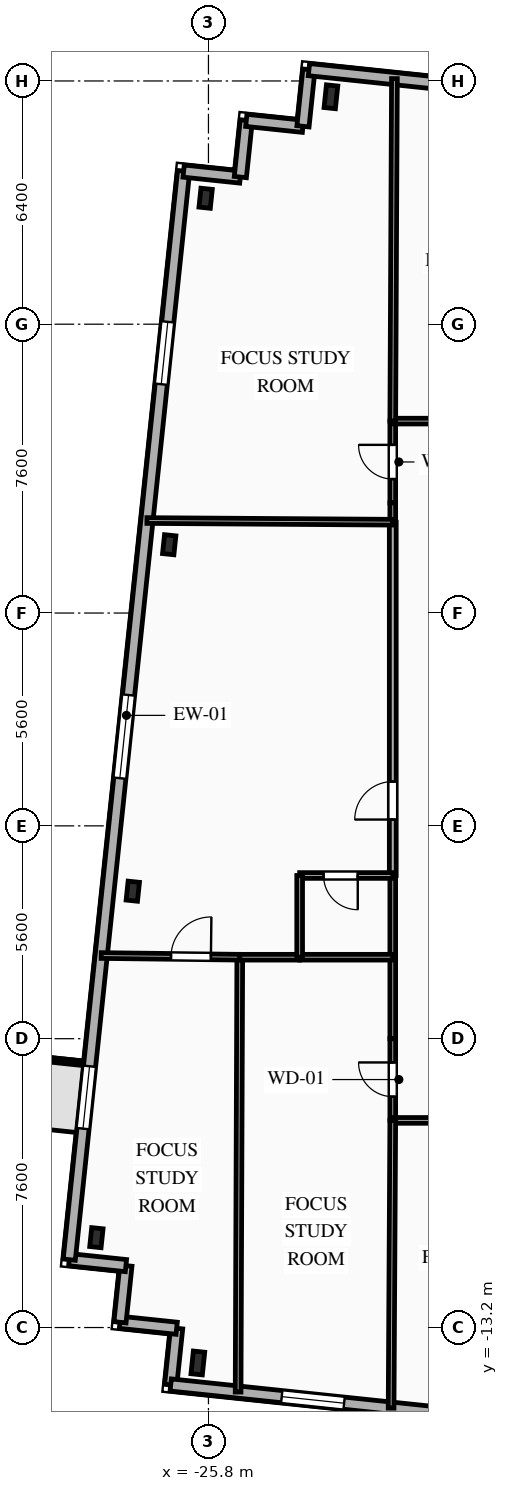
"""IFC4 building model, lengths in metres.
Left out: names, types, materials, properties, quantities, classifications, styles, units other than length and angle.
Written with IfcOpenShell. Run it as: python <this file> out.ifc"""

import sys

from ifc_helpers import new_model, si_unit, direction, frame, frame_2d, origin, origin_2d, place, context, subcontext, project, spatial, rectangle, i_section, extrude, element, fill, save


model = new_model("IFC4")
c1 = context("Model", 3, precision=1e-05, world=origin(), true_north=direction((0.0, 1.0)))
c2 = subcontext(c1, "Body", "Model", "MODEL_VIEW")
j1 = project(units=[si_unit("LENGTHUNIT", "METRE"), si_unit("PLANEANGLEUNIT", "RADIAN")], contexts=[c1])
p1 = place(None, origin())
s1 = spatial("IfcSite", under=j1, at=p1, CompositionType="ELEMENT")
p2 = place(p1, origin())
s2 = spatial("IfcBuilding", under=s1, at=p2, CompositionType="ELEMENT")
p3 = place(p2, frame((0.0, 0.0, 213.15)))
s3 = spatial("IfcBuildingStorey", under=s2, at=p3, CompositionType="ELEMENT", Elevation=213.15)
for number, where, z_axis, x_axis in (
    (1, (-26.079, -14.133, 0.0), (0.0, 0.0, 1.0), (0.995, -0.105, 0.0)),
    (2, (-22.577, 19.184, 0.0), (0.0, 0.0, 1.0), (0.995, -0.105, 0.0)),
):
    element("IfcColumn", number, at=place(p3, frame(where, z_axis=z_axis, x_axis=x_axis)), inside=s3, PredefinedType="COLUMN", context=c2, shape_type="SweptSolid", body=[
        extrude(i_section(OverallWidth=0.3, OverallDepth=0.6, WebThickness=0.015, FlangeThickness=0.03, FilletRadius=0.027, at=origin_2d()), origin(), (0.0, 0.0, 1.0), 3.35),
    ])
for number, where, z_axis, x_axis in (
    (3, (-25.875, 16.514, 0.0), (0.0, 0.0, 1.0), (0.995, -0.105, 0.0)),
    (4, (-26.833, 7.398, 0.0), (0.0, 0.0, 1.0), (0.995, -0.105, 0.0)),
    (5, (-27.791, -1.719, 0.0), (0.0, 0.0, 1.0), (0.995, -0.105, 0.0)),
    (6, (-28.749, -10.835, 0.0), (0.0, 0.0, 1.0), (0.995, -0.105, 0.0)),
):
    element("IfcColumn", number, at=place(p3, frame(where, z_axis=z_axis, x_axis=x_axis)), inside=s3, PredefinedType="COLUMN", context=c2, shape_type="SweptSolid", body=[
        extrude(i_section(OverallWidth=0.3, OverallDepth=0.5, WebThickness=0.014, FlangeThickness=0.028, FilletRadius=0.027, at=origin_2d()), origin(), (0.0, 0.0, 1.0), 3.35),
    ])
for number, where, z_axis, x_axis in (
    (7, (-26.793, -14.711, 0.0), (0.0, 0.0, 1.0), (0.104, 0.995, 0.0)),
    (8, (-26.637, -13.219, 0.0), (0.0, 0.0, 1.0), (-0.995, 0.104, 0.0)),
):
    element("IfcWall", number, at=place(p3, frame(where, z_axis=z_axis, x_axis=x_axis)), inside=s3, PredefinedType="SOLIDWALL", context=c2, shape_type="SweptSolid", body=[
        extrude(rectangle(XDim=1.5, YDim=0.32, at=frame_2d((0.75, 0.0))), origin(), (0.0, 0.0, 1.0), 3.04),
    ])
p4 = place(p3, frame((-28.128, -13.062, 0.0), z_axis=(0.0, 0.0, 1.0), x_axis=(0.104481464157, 0.994526834051, 0.0)))
e9 = element("IfcWall", 9, at=p4, inside=s3, PredefinedType="SOLIDWALL", context=c2, shape_type="SweptSolid", body=[
    extrude(rectangle(XDim=1.5, YDim=0.32, at=frame_2d((0.75, 0.0))), origin(), (0.0, 0.0, 1.0), 3.04),
])
p5 = place(p3, frame((-27.972, -11.571, 0.0), z_axis=(0.0, 0.0, 1.0), x_axis=(-0.994525057048, 0.104498377516, 0.0)))
e10 = element("IfcWall", 10, at=p5, inside=s3, PredefinedType="SOLIDWALL", context=c2, shape_type="SweptSolid", body=[
    extrude(rectangle(XDim=1.5, YDim=0.32, at=frame_2d((0.75, 0.0))), origin(), (0.0, 0.0, 1.0), 3.04),
])
p6 = place(p3, frame((-29.463, -11.414, 0.0), z_axis=(0.0, 0.0, 1.0), x_axis=(0.104530779244, 0.994521651947, 0.0)))
e11 = element("IfcWall", 11, at=p6, inside=s3, PredefinedType="SOLIDWALL", context=c2, shape_type="SweptSolid", body=[
    extrude(rectangle(XDim=28.8, YDim=0.32, at=frame_2d((14.4, 0.0))), origin(), (0.0, 0.0, 1.0), 3.04),
])
p7 = place(p6, frame((3.467, 0.0, 0.85)))
e12 = element("IfcOpeningElement", 12, at=p7, cuts=e11, PredefinedType="OPENING", context=c2, shape_type="SweptSolid", body=[
    extrude(rectangle(XDim=1.65, YDim=1.85, at=frame_2d((0.825, 0.925))), frame((0.0, 0.17, 0.0), z_axis=(0.0, -1.0, 0.0), x_axis=(1.0, 0.0, 0.0)), (0.0, 0.0, 1.0), 0.34),
])
p8 = place(p6, frame((12.738, 0.0, 0.85)))
e13 = element("IfcOpeningElement", 13, at=p8, cuts=e11, PredefinedType="OPENING", context=c2, shape_type="SweptSolid", body=[
    extrude(rectangle(XDim=2.2, YDim=1.85, at=frame_2d((1.1, 0.925))), frame((0.0, 0.17, 0.0), z_axis=(0.0, -1.0, 0.0), x_axis=(1.0, 0.0, 0.0)), (0.0, 0.0, 1.0), 0.34),
])
p9 = place(p6, frame((23.162, 0.0, 0.85)))
e14 = element("IfcOpeningElement", 14, at=p9, cuts=e11, PredefinedType="OPENING", context=c2, shape_type="SweptSolid", body=[
    extrude(rectangle(XDim=1.65, YDim=1.85, at=frame_2d((0.825, 0.925))), frame((0.0, 0.17, 0.0), z_axis=(0.0, -1.0, 0.0), x_axis=(1.0, 0.0, 0.0)), (0.0, 0.0, 1.0), 0.34),
])
p10 = place(p3, frame((-26.453, 17.229, 0.0), z_axis=(0.0, 0.0, 1.0), x_axis=(0.994508128223, -0.104659366031, 0.0)))
e15 = element("IfcWall", 15, at=p10, inside=s3, PredefinedType="SOLIDWALL", context=c2, shape_type="SweptSolid", body=[
    extrude(rectangle(XDim=1.5, YDim=0.32, at=frame_2d((0.75, 0.0))), origin(), (0.0, 0.0, 1.0), 3.04),
])
p11 = place(p3, frame((-24.961, 17.072, 0.0), z_axis=(0.0, 0.0, 1.0), x_axis=(0.104642427191, 0.994509910675, 0.0)))
e16 = element("IfcWall", 16, at=p11, inside=s3, PredefinedType="SOLIDWALL", context=c2, shape_type="SweptSolid", body=[
    extrude(rectangle(XDim=1.5, YDim=0.32, at=frame_2d((0.75, 0.0))), origin(), (0.0, 0.0, 1.0), 3.04),
])
p12 = place(p3, frame((-24.804, 18.563, 0.0), z_axis=(0.0, 0.0, 1.0), x_axis=(0.994508128223, -0.104659366031, 0.0)))
e17 = element("IfcWall", 17, at=p12, inside=s3, PredefinedType="SOLIDWALL", context=c2, shape_type="SweptSolid", body=[
    extrude(rectangle(XDim=1.5, YDim=0.32, at=frame_2d((0.75, 0.0))), origin(), (0.0, 0.0, 1.0), 3.04),
])
p13 = place(p3, frame((-23.312, 18.406, 0.0), z_axis=(0.0, 0.0, 1.0), x_axis=(0.104481464157, 0.994526834051, 0.0)))
e18 = element("IfcWall", 18, at=p13, inside=s3, PredefinedType="SOLIDWALL", context=c2, shape_type="SweptSolid", body=[
    extrude(rectangle(XDim=1.5, YDim=0.32, at=frame_2d((0.75, 0.0))), origin(), (0.0, 0.0, 1.0), 3.04),
])
p14 = place(p3, frame((-23.156, 19.898, 0.0), z_axis=(0.0, 0.0, 1.0), x_axis=(0.994522001802, -0.104527450613, 0.0)))
e19 = element("IfcWall", 19, at=p14, inside=s3, PredefinedType="SOLIDWALL", context=c2, shape_type="SweptSolid", body=[
    extrude(rectangle(XDim=45.8, YDim=0.32, at=frame_2d((22.9, 0.0))), origin(), (0.0, 0.0, 1.0), 3.04),
])
p15 = place(p14, frame((4.9, 0.0, 0.85)))
e20 = element("IfcOpeningElement", 20, at=p15, cuts=e19, PredefinedType="OPENING", context=c2, shape_type="SweptSolid", body=[
    extrude(rectangle(XDim=1.65, YDim=1.85, at=frame_2d((0.825, 0.925))), frame((0.0, 0.17, 0.0), z_axis=(0.0, -1.0, 0.0), x_axis=(1.0, 0.0, 0.0)), (0.0, 0.0, 1.0), 0.34),
])
p16 = place(p14, frame((11.706, 0.0, 0.85)))
e21 = element("IfcOpeningElement", 21, at=p16, cuts=e19, PredefinedType="OPENING", context=c2, shape_type="SweptSolid", body=[
    extrude(rectangle(XDim=1.65, YDim=1.85, at=frame_2d((0.825, 0.925))), frame((0.0, 0.17, 0.0), z_axis=(0.0, -1.0, 0.0), x_axis=(1.0, 0.0, 0.0)), (0.0, 0.0, 1.0), 0.34),
])
p17 = place(p14, frame((23.431, 0.0, 0.85)))
e22 = element("IfcOpeningElement", 22, at=p17, cuts=e19, PredefinedType="OPENING", context=c2, shape_type="SweptSolid", body=[
    extrude(rectangle(XDim=1.5, YDim=1.85, at=frame_2d((0.75, 0.925))), frame((0.0, 0.17, 0.0), z_axis=(0.0, -1.0, 0.0), x_axis=(1.0, 0.0, 0.0)), (0.0, 0.0, 1.0), 0.34),
])
p18 = place(p14, frame((34.628, 0.0, 0.85)))
e23 = element("IfcOpeningElement", 23, at=p18, cuts=e19, PredefinedType="OPENING", context=c2, shape_type="SweptSolid", body=[
    extrude(rectangle(XDim=1.65, YDim=1.85, at=frame_2d((0.825, 0.925))), frame((0.0, 0.17, 0.0), z_axis=(0.0, -1.0, 0.0), x_axis=(1.0, 0.0, 0.0)), (0.0, 0.0, 1.0), 0.34),
])
p19 = place(p3, frame((18.756, -19.498, 0.0), z_axis=(0.0, 0.0, 1.0), x_axis=(-0.994522060044, 0.104526896475, 0.0)))
e24 = element("IfcWall", 24, at=p19, inside=s3, PredefinedType="SOLIDWALL", context=c2, shape_type="SweptSolid", body=[
    extrude(rectangle(XDim=45.8, YDim=0.32, at=frame_2d((22.9, 0.0))), origin(), (0.0, 0.0, 1.0), 3.04),
])
p20 = place(p19, frame((1.657, 0.0, 0.85)))
e25 = element("IfcOpeningElement", 25, at=p20, cuts=e24, PredefinedType="OPENING", context=c2, shape_type="SweptSolid", body=[
    extrude(rectangle(XDim=1.65, YDim=1.85, at=frame_2d((0.825, 0.925))), frame((0.0, 0.17, 0.0), z_axis=(0.0, -1.0, 0.0), x_axis=(1.0, 0.0, 0.0)), (0.0, 0.0, 1.0), 0.34),
])
p21 = place(p19, frame((6.907, 0.0, 0.85)))
e26 = element("IfcOpeningElement", 26, at=p21, cuts=e24, PredefinedType="OPENING", context=c2, shape_type="SweptSolid", body=[
    extrude(rectangle(XDim=2.2, YDim=1.85, at=frame_2d((1.1, 0.925))), frame((0.0, 0.17, 0.0), z_axis=(0.0, -1.0, 0.0), x_axis=(1.0, 0.0, 0.0)), (0.0, 0.0, 1.0), 0.34),
])
p22 = place(p19, frame((13.953, 0.0, 0.85)))
e27 = element("IfcOpeningElement", 27, at=p22, cuts=e24, PredefinedType="OPENING", context=c2, shape_type="SweptSolid", body=[
    extrude(rectangle(XDim=2.2, YDim=1.85, at=frame_2d((1.1, 0.925))), frame((0.0, 0.17, 0.0), z_axis=(0.0, -1.0, 0.0), x_axis=(1.0, 0.0, 0.0)), (0.0, 0.0, 1.0), 0.34),
])
p23 = place(p19, frame((20.959, 0.0, 0.85)))
e28 = element("IfcOpeningElement", 28, at=p23, cuts=e24, PredefinedType="OPENING", context=c2, shape_type="SweptSolid", body=[
    extrude(rectangle(XDim=2.2, YDim=1.85, at=frame_2d((1.1, 0.925))), frame((0.0, 0.17, 0.0), z_axis=(0.0, -1.0, 0.0), x_axis=(1.0, 0.0, 0.0)), (0.0, 0.0, 1.0), 0.34),
])
p24 = place(p19, frame((27.965, 0.0, 0.85)))
e29 = element("IfcOpeningElement", 29, at=p24, cuts=e24, PredefinedType="OPENING", context=c2, shape_type="SweptSolid", body=[
    extrude(rectangle(XDim=2.2, YDim=1.85, at=frame_2d((1.1, 0.925))), frame((0.0, 0.17, 0.0), z_axis=(0.0, -1.0, 0.0), x_axis=(1.0, 0.0, 0.0)), (0.0, 0.0, 1.0), 0.34),
])
p25 = place(p19, frame((35.487, 0.0, 0.85)))
e30 = element("IfcOpeningElement", 30, at=p25, cuts=e24, PredefinedType="OPENING", context=c2, shape_type="SweptSolid", body=[
    extrude(rectangle(XDim=1.65, YDim=1.85, at=frame_2d((0.825, 0.925))), frame((0.0, 0.17, 0.0), z_axis=(0.0, -1.0, 0.0), x_axis=(1.0, 0.0, 0.0)), (0.0, 0.0, 1.0), 0.34),
])
p26 = place(p19, frame((41.212, 0.0, 0.85)))
e31 = element("IfcOpeningElement", 31, at=p26, cuts=e24, PredefinedType="OPENING", context=c2, shape_type="SweptSolid", body=[
    extrude(rectangle(XDim=1.65, YDim=1.85, at=frame_2d((0.825, 0.925))), frame((0.0, 0.17, 0.0), z_axis=(0.0, -1.0, 0.0), x_axis=(1.0, 0.0, 0.0)), (0.0, 0.0, 1.0), 0.34),
])
p27 = place(p3, frame((-20.95, 8.5, 0.0), z_axis=(0.0, 0.0, 1.0), x_axis=(0.0, 1.0, 0.0)))
e32 = element("IfcWall", 32, at=p27, inside=s3, PredefinedType="PARTITIONING", context=c2, shape_type="SweptSolid", body=[
    extrude(rectangle(XDim=2.15, YDim=0.15, at=frame_2d((1.075, 0.0))), origin(), (0.0, 0.0, 1.0), 3.04),
])
p28 = place(p27, frame((0.625, 0.0, 0.0)))
e33 = element("IfcOpeningElement", 33, at=p28, cuts=e32, PredefinedType="OPENING", context=c2, shape_type="SweptSolid", body=[
    extrude(rectangle(XDim=0.9, YDim=2.1, at=frame_2d((0.45, 1.05))), frame((0.0, 0.085, 0.0), z_axis=(0.0, -1.0, 0.0), x_axis=(1.0, 0.0, 0.0)), (0.0, 0.0, 1.0), 0.17),
])
p29 = place(p3, frame((-20.95, 10.65, 0.0), z_axis=(0.0, 0.0, 1.0), x_axis=(1.0, 0.0, 0.0)))
e34 = element("IfcWall", 34, at=p29, inside=s3, PredefinedType="PARTITIONING", context=c2, shape_type="SweptSolid", body=[
    extrude(rectangle(XDim=6.783, YDim=0.15, at=frame_2d((3.392, 0.0))), origin(), (0.0, 0.0, 1.0), 3.04),
])
p30 = place(p29, frame((4.582, 0.0, 0.0)))
e35 = element("IfcOpeningElement", 35, at=p30, cuts=e34, PredefinedType="OPENING", context=c2, shape_type="SweptSolid", body=[
    extrude(rectangle(XDim=1.05, YDim=2.15, at=frame_2d((0.525, 1.075))), frame((0.0, 0.085, 0.0), z_axis=(0.0, -1.0, 0.0), x_axis=(1.0, 0.0, 0.0)), (0.0, 0.0, 1.0), 0.17),
])
p31 = place(p3, frame((-20.95, -7.75, 0.0), z_axis=(0.0, 0.0, 1.0), x_axis=(0.0, 1.0, 0.0)))
e36 = element("IfcWall", 36, at=p31, inside=s3, PredefinedType="PARTITIONING", context=c2, shape_type="SweptSolid", body=[
    extrude(rectangle(XDim=2.15, YDim=0.15, at=frame_2d((1.075, 0.0))), origin(), (0.0, 0.0, 1.0), 3.04),
])
p32 = place(p31, frame((0.625, 0.0, 0.0)))
e37 = element("IfcOpeningElement", 37, at=p32, cuts=e36, PredefinedType="OPENING", context=c2, shape_type="SweptSolid", body=[
    extrude(rectangle(XDim=0.9, YDim=2.1, at=frame_2d((0.45, 1.05))), frame((0.0, 0.085, 0.0), z_axis=(0.0, -1.0, 0.0), x_axis=(1.0, 0.0, 0.0)), (0.0, 0.0, 1.0), 0.17),
])
p33 = place(p3, frame((-13.567, -7.75, 0.0), z_axis=(0.0, 0.0, 1.0), x_axis=(-1.0, 0.0, 0.0)))
e38 = element("IfcWall", 38, at=p33, inside=s3, PredefinedType="PARTITIONING", context=c2, shape_type="SweptSolid", body=[
    extrude(rectangle(XDim=7.383, YDim=0.15, at=frame_2d((3.691, 0.0))), origin(), (0.0, 0.0, 1.0), 3.04),
])
p34 = place(p33, frame((1.227, 0.0, 0.0)))
e39 = element("IfcOpeningElement", 39, at=p34, cuts=e38, PredefinedType="OPENING", context=c2, shape_type="SweptSolid", body=[
    extrude(rectangle(XDim=1.05, YDim=2.15, at=frame_2d((0.525, 1.075))), frame((0.0, 0.085, 0.0), z_axis=(0.0, -1.0, 0.0), x_axis=(1.0, 0.0, 0.0)), (0.0, 0.0, 1.0), 0.17),
])
p35 = place(p3, frame((-20.95, -5.6, 0.0), z_axis=(0.0, 0.0, 1.0), x_axis=(0.0, 1.0, 0.0)))
e40 = element("IfcWall", 40, at=p35, inside=s3, PredefinedType="PARTITIONING", context=c2, shape_type="SweptSolid", body=[
    extrude(rectangle(XDim=2.144, YDim=0.15, at=frame_2d((1.072, 0.0))), origin(), (0.0, 0.0, 1.0), 3.04),
])
p36 = place(p3, frame((-20.95, -1.306, 0.0), z_axis=(0.0, 0.0, 1.0), x_axis=(0.0, 1.0, 0.0)))
e41 = element("IfcWall", 41, at=p36, inside=s3, PredefinedType="PARTITIONING", context=c2, shape_type="SweptSolid", body=[
    extrude(rectangle(XDim=9.296, YDim=0.18, at=frame_2d((4.648, 0.0))), origin(), (0.0, 0.0, 1.0), 3.04),
])
p37 = place(p36, frame((1.472, 0.0, 0.0)))
e42 = element("IfcOpeningElement", 42, at=p37, cuts=e41, PredefinedType="OPENING", context=c2, shape_type="SweptSolid", body=[
    extrude(rectangle(XDim=1.0, YDim=2.15, at=frame_2d((0.5, 1.075))), frame((0.0, 0.1, 0.0), z_axis=(0.0, -1.0, 0.0), x_axis=(1.0, 0.0, 0.0)), (0.0, 0.0, 1.0), 0.2),
])
p38 = place(p3, frame((-20.95, -3.456, 0.0), z_axis=(0.0, 0.0, 1.0), x_axis=(0.0, 1.0, 0.0)))
e43 = element("IfcWall", 43, at=p38, inside=s3, PredefinedType="PLUMBINGWALL", context=c2, shape_type="SweptSolid", body=[
    extrude(rectangle(XDim=2.15, YDim=0.15, at=frame_2d((1.075, 0.0))), origin(), (0.0, 0.0, 1.0), 3.04),
])
p39 = place(p3, frame((-20.95, 7.99, 0.0), z_axis=(0.0, 0.0, 1.0), x_axis=(0.0, 1.0, 0.0)))
e44 = element("IfcWall", 44, at=p39, inside=s3, PredefinedType="PARTITIONING", context=c2, shape_type="SweptSolid", body=[
    extrude(rectangle(XDim=0.51, YDim=0.15, at=frame_2d((0.255, 0.0))), origin(), (0.0, 0.0, 1.0), 3.04),
])
p40 = place(p3, frame((-24.976, -3.456, 0.0), z_axis=(0.0, 0.0, 1.0), x_axis=(-0.003840873, -0.99999262382, 0.0)))
e45 = element("IfcWall", 45, at=p40, inside=s3, PredefinedType="PARTITIONING", context=c2, shape_type="SweptSolid", body=[
    extrude(rectangle(XDim=11.441, YDim=0.15, at=frame_2d((5.721, 0.0))), origin(), (0.0, 0.0, 1.0), 3.04),
])
p41 = place(p3, frame((-28.622, -3.412, 0.0), z_axis=(0.0, 0.0, 1.0), x_axis=(0.999927389555, -0.01205054433, 0.0)))
e46 = element("IfcWall", 46, at=p41, inside=s3, PredefinedType="PARTITIONING", context=c2, shape_type="SweptSolid", body=[
    extrude(rectangle(XDim=3.647, YDim=0.15, at=frame_2d((1.823, 0.0))), origin(), (0.0, 0.0, 1.0), 3.04),
])
p42 = place(p41, frame((1.837, 0.0, 0.0)))
e47 = element("IfcOpeningElement", 47, at=p42, cuts=e46, PredefinedType="OPENING", context=c2, shape_type="SweptSolid", body=[
    extrude(rectangle(XDim=1.05, YDim=2.15, at=frame_2d((0.525, 1.075))), frame((0.0, 0.085, 0.0), z_axis=(0.0, -1.0, 0.0), x_axis=(1.0, 0.0, 0.0)), (0.0, 0.0, 1.0), 0.17),
])
p43 = place(p3, frame((-24.976, -3.456, 0.0), z_axis=(0.0, 0.0, 1.0), x_axis=(1.0, 0.0, 0.0)))
e48 = element("IfcWall", 48, at=p43, inside=s3, PredefinedType="PARTITIONING", context=c2, shape_type="SweptSolid", body=[
    extrude(rectangle(XDim=1.576, YDim=0.15, at=frame_2d((0.788, 0.0))), origin(), (0.0, 0.0, 1.0), 3.04),
])
p44 = place(p3, frame((-23.4, -3.456, 0.0), z_axis=(0.0, 0.0, 1.0), x_axis=(1.0, 0.0, 0.0)))
e49 = element("IfcWall", 49, at=p44, inside=s3, PredefinedType="PLUMBINGWALL", context=c2, shape_type="SweptSolid", body=[
    extrude(rectangle(XDim=2.45, YDim=0.15, at=frame_2d((1.225, 0.0))), origin(), (0.0, 0.0, 1.0), 3.04),
])
p45 = place(p3, frame((-20.95, -7.75, 0.0), z_axis=(0.0, 0.0, 1.0), x_axis=(-0.005804668564, -0.99998315277, 0.0)))
e50 = element("IfcWall", 50, at=p45, inside=s3, PredefinedType="PARTITIONING", context=c2, shape_type="SweptSolid", body=[
    extrude(rectangle(XDim=7.571, YDim=0.15, at=frame_2d((3.785, 0.0))), origin(), (0.0, 0.0, 1.0), 3.04),
])
p46 = place(p3, frame((-20.95, -1.306, 0.0), z_axis=(0.0, 0.0, 1.0), x_axis=(-1.0, 0.0, 0.0)))
e51 = element("IfcWall", 51, at=p46, inside=s3, PredefinedType="PLUMBINGWALL", context=c2, shape_type="SweptSolid", body=[
    extrude(rectangle(XDim=2.45, YDim=0.15, at=frame_2d((1.225, 0.0))), origin(), (0.0, 0.0, 1.0), 3.04),
])
p47 = place(p46, frame((0.921, 0.0, 0.0)))
e52 = element("IfcOpeningElement", 52, at=p47, cuts=e51, PredefinedType="OPENING", context=c2, shape_type="SweptSolid", body=[
    extrude(rectangle(XDim=0.9, YDim=2.1, at=frame_2d((0.45, 1.05))), frame((0.0, 0.085, 0.0), z_axis=(0.0, -1.0, 0.0), x_axis=(1.0, 0.0, 0.0)), (0.0, 0.0, 1.0), 0.17),
])
p48 = place(p3, frame((-23.4, -1.306, 0.0), z_axis=(0.0, 0.0, 1.0), x_axis=(0.0, -1.0, 0.0)))
e53 = element("IfcWall", 53, at=p48, inside=s3, PredefinedType="PLUMBINGWALL", context=c2, shape_type="SweptSolid", body=[
    extrude(rectangle(XDim=2.15, YDim=0.15, at=frame_2d((1.075, 0.0))), origin(), (0.0, 0.0, 1.0), 2.695),
])
p49 = place(p3, frame((-27.419, 8.034, 0.0), z_axis=(0.0, 0.0, 1.0), x_axis=(0.999976928608, -0.006792808784, 0.0)))
e54 = element("IfcWall", 54, at=p49, inside=s3, PredefinedType="PARTITIONING", context=c2, shape_type="SweptSolid", body=[
    extrude(rectangle(XDim=6.469, YDim=0.15, at=frame_2d((3.235, 0.0))), origin(), (0.0, 0.0, 1.0), 3.04),
])
p50 = place(p3, frame((-20.906, 19.662, 0.0), z_axis=(0.0, 0.0, 1.0), x_axis=(-0.004876272857, -0.999988110911, 0.0)))
e55 = element("IfcWall", 55, at=p50, inside=s3, PredefinedType="PARTITIONING", context=c2, shape_type="SweptSolid", body=[
    extrude(rectangle(XDim=9.012, YDim=0.15, at=frame_2d((4.506, 0.0))), origin(), (0.0, 0.0, 1.0), 2.665),
])
p51 = place(p7, origin())
e56 = element("IfcWindow", 56, at=p51, inside=s3, PartitioningType="SINGLE_PANEL", PredefinedType="WINDOW", context=c2, shape_type="SweptSolid", body=[
    extrude(rectangle(XDim=1.65, YDim=1.85, at=frame_2d((0.825, 0.925))), frame((0.0, 0.03, 0.0), z_axis=(0.0, -1.0, 0.0), x_axis=(1.0, 0.0, 0.0)), (0.0, 0.0, 1.0), 0.06),
])
fill(e12, e56)
p52 = place(p8, origin())
e57 = element("IfcWindow", 57, at=p52, inside=s3, PartitioningType="SINGLE_PANEL", PredefinedType="WINDOW", context=c2, shape_type="SweptSolid", body=[
    extrude(rectangle(XDim=2.2, YDim=1.85, at=frame_2d((1.1, 0.925))), frame((0.0, 0.03, 0.0), z_axis=(0.0, -1.0, 0.0), x_axis=(1.0, 0.0, 0.0)), (0.0, 0.0, 1.0), 0.06),
])
fill(e13, e57)
p53 = place(p9, origin())
e58 = element("IfcWindow", 58, at=p53, inside=s3, PartitioningType="SINGLE_PANEL", PredefinedType="WINDOW", context=c2, shape_type="SweptSolid", body=[
    extrude(rectangle(XDim=1.65, YDim=1.85, at=frame_2d((0.825, 0.925))), frame((0.0, 0.03, 0.0), z_axis=(0.0, -1.0, 0.0), x_axis=(1.0, 0.0, 0.0)), (0.0, 0.0, 1.0), 0.06),
])
fill(e14, e58)
p54 = place(p26, origin())
e59 = element("IfcWindow", 59, at=p54, inside=s3, PartitioningType="SINGLE_PANEL", PredefinedType="WINDOW", context=c2, shape_type="SweptSolid", body=[
    extrude(rectangle(XDim=1.65, YDim=1.85, at=frame_2d((0.825, 0.925))), frame((0.0, 0.03, 0.0), z_axis=(0.0, -1.0, 0.0), x_axis=(1.0, 0.0, 0.0)), (0.0, 0.0, 1.0), 0.06),
])
fill(e31, e59)
p55 = place(p28, origin())
e60 = element("IfcDoor", 60, at=p55, inside=s3, OperationType="SINGLE_SWING_RIGHT", PredefinedType="DOOR", context=c2, shape_type="SweptSolid", body=[
    extrude(rectangle(XDim=0.9, YDim=2.1, at=frame_2d((0.45, 1.05))), frame((0.0, 0.025, 0.0), z_axis=(0.0, -1.0, 0.0), x_axis=(1.0, 0.0, 0.0)), (0.0, 0.0, 1.0), 0.05),
])
fill(e33, e60)
p56 = place(p32, origin())
e61 = element("IfcDoor", 61, at=p56, inside=s3, OperationType="SINGLE_SWING_RIGHT", PredefinedType="DOOR", context=c2, shape_type="SweptSolid", body=[
    extrude(rectangle(XDim=0.9, YDim=2.1, at=frame_2d((0.45, 1.05))), frame((0.0, 0.025, 0.0), z_axis=(0.0, -1.0, 0.0), x_axis=(1.0, 0.0, 0.0)), (0.0, 0.0, 1.0), 0.05),
])
fill(e37, e61)
p57 = place(p37, origin())
e62 = element("IfcDoor", 62, at=p57, inside=s3, OperationType="SINGLE_SWING_LEFT", PredefinedType="DOOR", context=c2, shape_type="SweptSolid", body=[
    extrude(rectangle(XDim=1.0, YDim=2.15, at=frame_2d((0.5, 1.075))), frame((0.0, 0.025, 0.0), z_axis=(0.0, -1.0, 0.0), x_axis=(1.0, 0.0, 0.0)), (0.0, 0.0, 1.0), 0.05),
])
fill(e42, e62)
p58 = place(p42, origin())
e63 = element("IfcDoor", 63, at=p58, inside=s3, OperationType="SINGLE_SWING_RIGHT", PredefinedType="DOOR", context=c2, shape_type="SweptSolid", body=[
    extrude(rectangle(XDim=1.05, YDim=2.15, at=frame_2d((0.525, 1.075))), frame((0.0, 0.025, 0.0), z_axis=(0.0, -1.0, 0.0), x_axis=(1.0, 0.0, 0.0)), (0.0, 0.0, 1.0), 0.05),
])
fill(e47, e63)
p59 = place(p47, origin())
e64 = element("IfcDoor", 64, at=p59, inside=s3, OperationType="SINGLE_SWING_LEFT", PredefinedType="DOOR", context=c2, shape_type="SweptSolid", body=[
    extrude(rectangle(XDim=0.9, YDim=2.1, at=frame_2d((0.45, 1.05))), frame((0.0, 0.025, 0.0), z_axis=(0.0, -1.0, 0.0), x_axis=(1.0, 0.0, 0.0)), (0.0, 0.0, 1.0), 0.05),
])
fill(e52, e64)
save(model, sys.argv[1])
